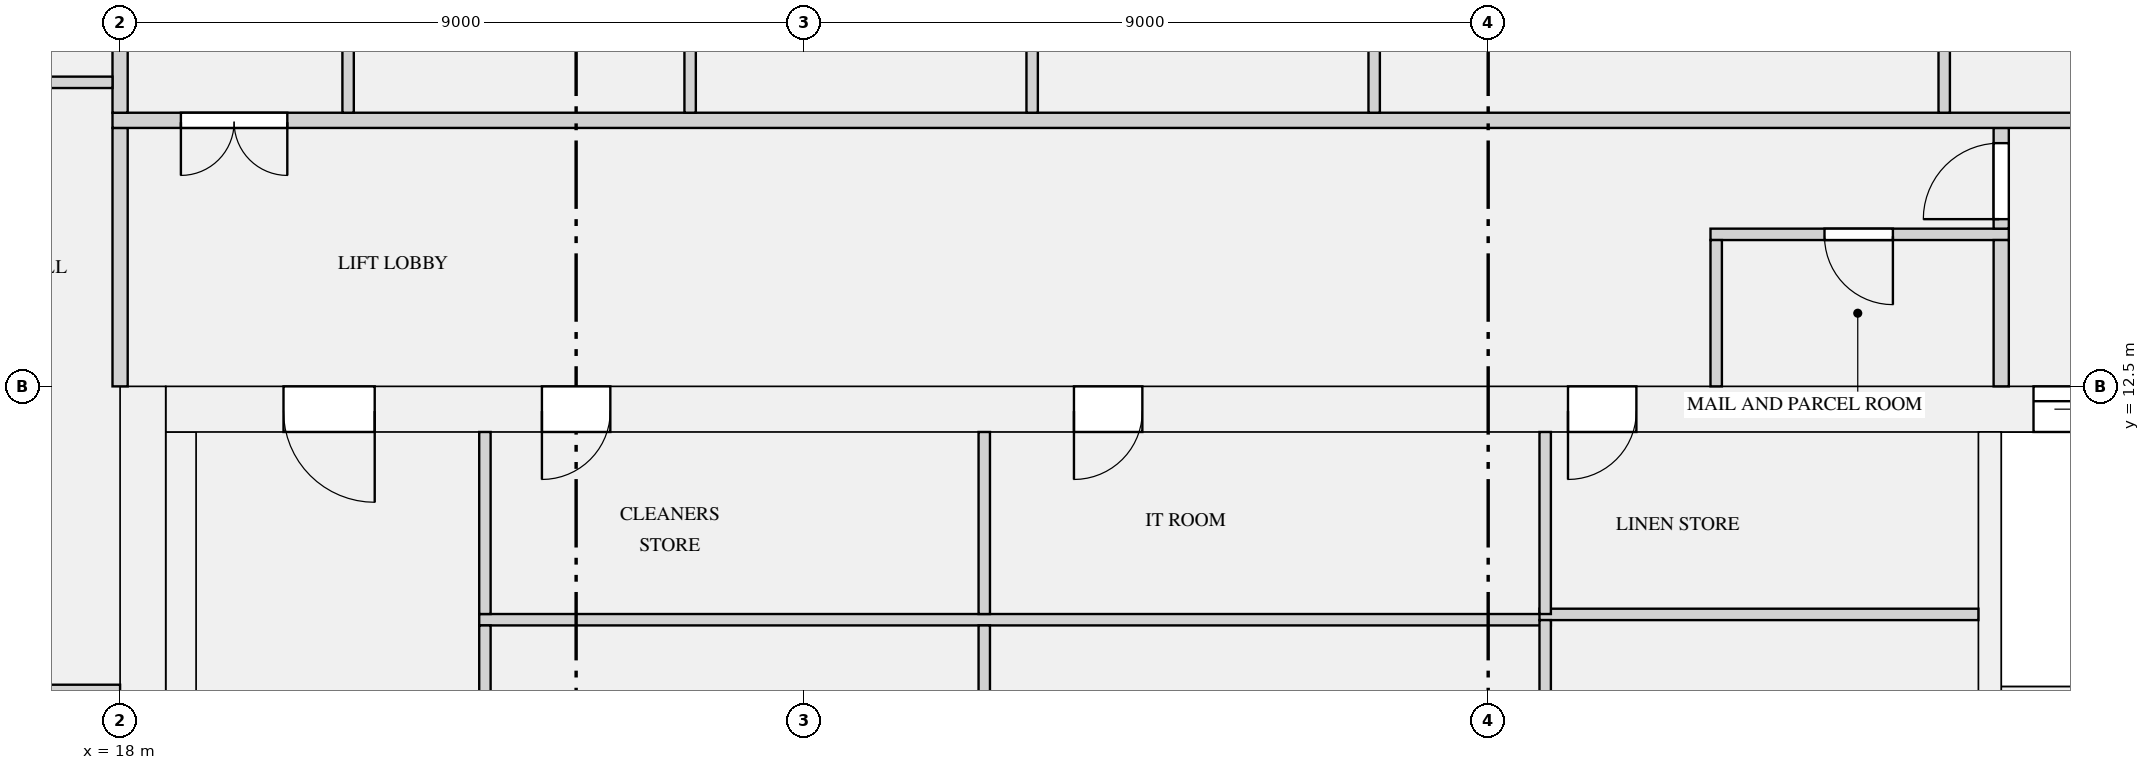
"""IFC4 building model, lengths in metres.
Left out: names, types, materials, properties, quantities, classifications, styles, units other than length and angle.
Written with IfcOpenShell. Run it as: python <this file> out.ifc"""

import sys

from ifc_helpers import new_model, si_unit, direction, frame, frame_2d, origin, place, context, subcontext, project, spatial, rectangle, extrude, element, fill, save


model = new_model("IFC4")
c1 = context("Model", 3, precision=1e-05, world=origin(), true_north=direction((0.0, 1.0)))
c2 = subcontext(c1, "Body", "Model", "MODEL_VIEW")
j1 = project(units=[si_unit("LENGTHUNIT", "METRE"), si_unit("PLANEANGLEUNIT", "RADIAN")], contexts=[c1])
p1 = place(None, origin())
s1 = spatial("IfcSite", under=j1, at=p1, CompositionType="ELEMENT")
p2 = place(p1, origin())
s2 = spatial("IfcBuilding", under=s1, at=p2, CompositionType="ELEMENT")
p3 = place(p2, frame((0.0, 0.0, 232.65)))
s3 = spatial("IfcBuildingStorey", under=s2, at=p3, CompositionType="ELEMENT", Elevation=232.65)
p4 = place(p3, frame((18.3, 0.0, 0.0), z_axis=(0.0, 0.0, 1.0), x_axis=(0.0, 1.0, 0.0)))
e1 = element("IfcWall", 1, at=p4, inside=s3, PredefinedType="SHEAR", context=c2, shape_type="SweptSolid", body=[
    extrude(rectangle(XDim=12.5, YDim=0.6, at=frame_2d((6.25, 0.0))), origin(), (0.0, 0.0, 1.0), 3.15),
])
p5 = place(p3, frame((18.6, 12.2, 0.0), z_axis=(0.0, 0.0, 1.0), x_axis=(1.0, 0.0, 0.0)))
e2 = element("IfcWall", 2, at=p5, inside=s3, PredefinedType="SHEAR", context=c2, shape_type="SweptSolid", body=[
    extrude(rectangle(XDim=34.8, YDim=0.6, at=frame_2d((17.4, 0.0))), origin(), (0.0, 0.0, 1.0), 3.15),
])
p6 = place(p5, frame((24.575, 0.0, 0.0)))
e3 = element("IfcOpeningElement", 3, at=p6, cuts=e2, PredefinedType="OPENING", context=c2, shape_type="SweptSolid", body=[
    extrude(rectangle(XDim=1.1, YDim=2.1, at=frame_2d((0.55, 1.05))), frame((0.0, 0.31, 0.0), z_axis=(0.0, -1.0, 0.0), x_axis=(1.0, 0.0, 0.0)), (0.0, 0.0, 1.0), 0.62),
])
p7 = place(p5, frame((26.825, 0.0, 0.0)))
e4 = element("IfcOpeningElement", 4, at=p7, cuts=e2, PredefinedType="OPENING", context=c2, shape_type="SweptSolid", body=[
    extrude(rectangle(XDim=1.1, YDim=2.1, at=frame_2d((0.55, 1.05))), frame((0.0, 0.31, 0.0), z_axis=(0.0, -1.0, 0.0), x_axis=(1.0, 0.0, 0.0)), (0.0, 0.0, 1.0), 0.62),
])
p8 = place(p5, frame((29.075, 0.0, 0.0)))
e5 = element("IfcOpeningElement", 5, at=p8, cuts=e2, PredefinedType="OPENING", context=c2, shape_type="SweptSolid", body=[
    extrude(rectangle(XDim=1.1, YDim=2.1, at=frame_2d((0.55, 1.05))), frame((0.0, 0.31, 0.0), z_axis=(0.0, -1.0, 0.0), x_axis=(1.0, 0.0, 0.0)), (0.0, 0.0, 1.0), 0.62),
])
p9 = place(p5, frame((4.95, 0.0, 0.0)))
e6 = element("IfcOpeningElement", 6, at=p9, cuts=e2, PredefinedType="OPENING", context=c2, shape_type="SweptSolid", body=[
    extrude(rectangle(XDim=0.9, YDim=2.1, at=frame_2d((0.45, 1.05))), frame((0.0, 0.31, 0.0), z_axis=(0.0, -1.0, 0.0), x_axis=(1.0, 0.0, 0.0)), (0.0, 0.0, 1.0), 0.62),
])
p10 = place(p5, frame((11.95, 0.0, 0.0)))
e7 = element("IfcOpeningElement", 7, at=p10, cuts=e2, PredefinedType="OPENING", context=c2, shape_type="SweptSolid", body=[
    extrude(rectangle(XDim=0.9, YDim=2.1, at=frame_2d((0.45, 1.05))), frame((0.0, 0.31, 0.0), z_axis=(0.0, -1.0, 0.0), x_axis=(1.0, 0.0, 0.0)), (0.0, 0.0, 1.0), 0.62),
])
p11 = place(p5, frame((18.45, 0.0, 0.0)))
e8 = element("IfcOpeningElement", 8, at=p11, cuts=e2, PredefinedType="OPENING", context=c2, shape_type="SweptSolid", body=[
    extrude(rectangle(XDim=0.9, YDim=2.1, at=frame_2d((0.45, 1.05))), frame((0.0, 0.31, 0.0), z_axis=(0.0, -1.0, 0.0), x_axis=(1.0, 0.0, 0.0)), (0.0, 0.0, 1.0), 0.62),
])
p12 = place(p5, frame((1.55, 0.0, 0.0)))
e9 = element("IfcOpeningElement", 9, at=p12, cuts=e2, PredefinedType="OPENING", context=c2, shape_type="SweptSolid", body=[
    extrude(rectangle(XDim=1.2, YDim=2.1, at=frame_2d((0.6, 1.05))), frame((0.0, 0.31, 0.0), z_axis=(0.0, -1.0, 0.0), x_axis=(1.0, 0.0, 0.0)), (0.0, 0.0, 1.0), 0.62),
])
p13 = place(p5, frame((32.05, 0.0, 0.0)))
e10 = element("IfcOpeningElement", 10, at=p13, cuts=e2, PredefinedType="OPENING", context=c2, shape_type="SweptSolid", body=[
    extrude(rectangle(XDim=1.2, YDim=2.1, at=frame_2d((0.6, 1.05))), frame((0.0, 0.31, 0.0), z_axis=(0.0, -1.0, 0.0), x_axis=(1.0, 0.0, 0.0)), (0.0, 0.0, 1.0), 0.62),
])
p14 = place(p3, frame((18.8, 1.0, 0.0), z_axis=(0.0, 0.0, 1.0), x_axis=(0.0, 1.0, 0.0)))
e11 = element("IfcWall", 11, at=p14, inside=s3, PredefinedType="SHEAR", context=c2, shape_type="SweptSolid", body=[
    extrude(rectangle(XDim=10.9, YDim=0.4, at=frame_2d((5.45, 0.0))), origin(), (0.0, 0.0, 1.0), 3.15),
])
p15 = place(p3, frame((42.75, 8.4, 0.0), z_axis=(0.0, 0.0, 1.0), x_axis=(1.0, 0.0, 0.0)))
e12 = element("IfcWall", 12, at=p15, inside=s3, PredefinedType="SHEAR", context=c2, shape_type="SweptSolid", body=[
    extrude(rectangle(XDim=1.95, YDim=0.3, at=frame_2d((0.975, 0.0))), origin(), (0.0, 0.0, 1.0), 3.15),
])
p16 = place(p3, frame((42.6, 8.25, 0.0), z_axis=(0.0, 0.0, 1.0), x_axis=(0.0, 1.0, 0.0)))
e13 = element("IfcWall", 13, at=p16, inside=s3, PredefinedType="SHEAR", context=c2, shape_type="SweptSolid", body=[
    extrude(rectangle(XDim=3.65, YDim=0.3, at=frame_2d((1.825, 0.0))), origin(), (0.0, 0.0, 1.0), 3.15),
])
p17 = place(p3, frame((22.725, 9.43, 0.0), z_axis=(0.0, 0.0, 1.0), x_axis=(1.0, 0.0, 0.0)))
e14 = element("IfcWall", 14, at=p17, inside=s3, PredefinedType="PARTITIONING", context=c2, shape_type="SweptSolid", body=[
    extrude(rectangle(XDim=14.1, YDim=0.15, at=frame_2d((7.05, 0.0))), origin(), (0.0, 0.0, 1.0), 2.8),
])
p18 = place(p3, frame((36.675, 9.5, 0.0), z_axis=(0.0, 0.0, 1.0), x_axis=(1.0, 0.0, 0.0)))
e15 = element("IfcWall", 15, at=p18, inside=s3, PredefinedType="PARTITIONING", context=c2, shape_type="SweptSolid", body=[
    extrude(rectangle(XDim=5.775, YDim=0.15, at=frame_2d((2.887, 0.0))), origin(), (0.0, 0.0, 1.0), 2.8),
])
p19 = place(p3, frame((38.925, 14.5, 0.0), z_axis=(0.0, 0.0, 1.0), x_axis=(1.0, 0.0, 0.0)))
e16 = element("IfcWall", 16, at=p19, inside=s3, PredefinedType="PARTITIONING", context=c2, shape_type="SweptSolid", body=[
    extrude(rectangle(XDim=3.925, YDim=0.15, at=frame_2d((1.962, 0.0))), origin(), (0.0, 0.0, 1.0), 2.8),
])
p20 = place(p19, frame((1.5, 0.0, 0.0)))
e17 = element("IfcOpeningElement", 17, at=p20, cuts=e16, PredefinedType="OPENING", context=c2, shape_type="SweptSolid", body=[
    extrude(rectangle(XDim=0.9, YDim=2.1, at=frame_2d((0.45, 1.05))), frame((0.0, 0.085, 0.0), z_axis=(0.0, -1.0, 0.0), x_axis=(1.0, 0.0, 0.0)), (0.0, 0.0, 1.0), 0.17),
])
for number, where, z_axis, x_axis in (
    (18, (22.8, 6.725, 0.0), (0.0, 0.0, 1.0), (0.0, 1.0, 0.0)),
    (19, (29.37, 6.725, 0.0), (0.0, 0.0, 1.0), (0.0, 1.0, 0.0)),
):
    element("IfcWall", number, at=place(p3, frame(where, z_axis=z_axis, x_axis=x_axis)), inside=s3, PredefinedType="PARTITIONING", context=c2, shape_type="SweptSolid", body=[
        extrude(rectangle(XDim=2.63, YDim=0.15, at=frame_2d((1.315, 0.0))), origin(), (0.0, 0.0, 1.0), 2.8),
    ])
p21 = place(p3, frame((36.75, 6.725, 0.0), z_axis=(0.0, 0.0, 1.0), x_axis=(0.0, 1.0, 0.0)))
e20 = element("IfcWall", 20, at=p21, inside=s3, PredefinedType="PARTITIONING", context=c2, shape_type="SweptSolid", body=[
    extrude(rectangle(XDim=2.7, YDim=0.15, at=frame_2d((1.35, 0.0))), origin(), (0.0, 0.0, 1.0), 2.8),
])
for number, where, z_axis, x_axis in (
    (21, (22.8, 9.505, 0.0), (0.0, 0.0, 1.0), (0.0, 1.0, 0.0)),
    (22, (29.37, 9.505, 0.0), (0.0, 0.0, 1.0), (0.0, 1.0, 0.0)),
    (23, (36.75, 9.505, 0.0), (0.0, 0.0, 1.0), (0.0, 1.0, 0.0)),
):
    element("IfcWall", number, at=place(p3, frame(where, z_axis=z_axis, x_axis=x_axis)), inside=s3, PredefinedType="PARTITIONING", context=c2, shape_type="SweptSolid", body=[
        extrude(rectangle(XDim=2.395, YDim=0.15, at=frame_2d((1.198, 0.0))), origin(), (0.0, 0.0, 1.0), 2.8),
    ])
p22 = place(p3, frame((18.0, 12.5, 0.0), z_axis=(0.0, 0.0, 1.0), x_axis=(0.0, 1.0, 0.0)))
e24 = element("IfcWall", 24, at=p22, inside=s3, PredefinedType="PARTITIONING", context=c2, shape_type="SweptSolid", body=[
    extrude(rectangle(XDim=3.4, YDim=0.2, at=frame_2d((1.7, 0.0))), origin(), (0.0, 0.0, 1.0), 2.8),
])
p23 = place(p3, frame((39.0, 12.5, 0.0), z_axis=(0.0, 0.0, 1.0), x_axis=(0.0, 1.0, 0.0)))
e25 = element("IfcWall", 25, at=p23, inside=s3, PredefinedType="PARTITIONING", context=c2, shape_type="SweptSolid", body=[
    extrude(rectangle(XDim=1.925, YDim=0.15, at=frame_2d((0.962, 0.0))), origin(), (0.0, 0.0, 1.0), 2.8),
])
p24 = place(p3, frame((42.75, 12.5, 0.0), z_axis=(0.0, 0.0, 1.0), x_axis=(0.0, 1.0, 0.0)))
e26 = element("IfcWall", 26, at=p24, inside=s3, PredefinedType="PARTITIONING", context=c2, shape_type="SweptSolid", body=[
    extrude(rectangle(XDim=1.925, YDim=0.2, at=frame_2d((0.962, 0.0))), origin(), (0.0, 0.0, 1.0), 2.8),
])
p25 = place(p3, frame((42.75, 14.575, 0.0), z_axis=(0.0, 0.0, 1.0), x_axis=(0.0, 1.0, 0.0)))
e27 = element("IfcWall", 27, at=p25, inside=s3, PredefinedType="PARTITIONING", context=c2, shape_type="SweptSolid", body=[
    extrude(rectangle(XDim=1.325, YDim=0.2, at=frame_2d((0.663, 0.0))), origin(), (0.0, 0.0, 1.0), 2.8),
])
p26 = place(p25, frame((0.125, 0.0, 0.0)))
e28 = element("IfcOpeningElement", 28, at=p26, cuts=e27, PredefinedType="OPENING", context=c2, shape_type="SweptSolid", body=[
    extrude(rectangle(XDim=1.0, YDim=2.1, at=frame_2d((0.5, 1.05))), frame((0.0, 0.11, 0.0), z_axis=(0.0, -1.0, 0.0), x_axis=(1.0, 0.0, 0.0)), (0.0, 0.0, 1.0), 0.22),
])
p27 = place(p3, frame((12.15, 16.5, 0.0), z_axis=(0.0, 0.0, 1.0), x_axis=(1.0, 0.0, 0.0)))
e29 = element("IfcWall", 29, at=p27, inside=s3, PredefinedType="PARTITIONING", context=c2, shape_type="SweptSolid", body=[
    extrude(rectangle(XDim=5.75, YDim=0.15, at=frame_2d((2.875, 0.0))), origin(), (0.0, 0.0, 1.0), 2.8),
])
p28 = place(p27, frame((0.4, 0.0, 0.0)))
e30 = element("IfcOpeningElement", 30, at=p28, cuts=e29, PredefinedType="OPENING", context=c2, shape_type="SweptSolid", body=[
    extrude(rectangle(XDim=0.9, YDim=2.1, at=frame_2d((0.45, 1.05))), frame((0.0, 0.085, 0.0), z_axis=(0.0, -1.0, 0.0), x_axis=(1.0, 0.0, 0.0)), (0.0, 0.0, 1.0), 0.17),
])
p29 = place(p27, frame((3.4, 0.0, 0.0)))
e31 = element("IfcOpeningElement", 31, at=p29, cuts=e29, PredefinedType="OPENING", context=c2, shape_type="SweptSolid", body=[
    extrude(rectangle(XDim=0.9, YDim=2.1, at=frame_2d((0.45, 1.05))), frame((0.0, 0.085, 0.0), z_axis=(0.0, -1.0, 0.0), x_axis=(1.0, 0.0, 0.0)), (0.0, 0.0, 1.0), 0.17),
])
p30 = place(p3, frame((9.65, 8.5, 0.0), z_axis=(0.0, 0.0, 1.0), x_axis=(1.0, 0.0, 0.0)))
e32 = element("IfcWall", 32, at=p30, inside=s3, PredefinedType="PARTITIONING", context=c2, shape_type="SweptSolid", body=[
    extrude(rectangle(XDim=8.35, YDim=0.15, at=frame_2d((4.175, 0.0))), origin(), (0.0, 0.0, 1.0), 2.8),
])
p31 = place(p30, frame((5.9, 0.0, 0.0)))
e33 = element("IfcOpeningElement", 33, at=p31, cuts=e32, PredefinedType="OPENING", context=c2, shape_type="SweptSolid", body=[
    extrude(rectangle(XDim=0.9, YDim=2.1, at=frame_2d((0.45, 1.05))), frame((0.0, 0.085, 0.0), z_axis=(0.0, -1.0, 0.0), x_axis=(1.0, 0.0, 0.0)), (0.0, 0.0, 1.0), 0.17),
])
p32 = place(p3, frame((17.9, 16.0, 0.0), z_axis=(0.0, 0.0, 1.0), x_axis=(1.0, 0.0, 0.0)))
e34 = element("IfcWall", 34, at=p32, inside=s3, PredefinedType="PARTITIONING", context=c2, shape_type="SweptSolid", body=[
    extrude(rectangle(XDim=36.2, YDim=0.2, at=frame_2d((18.1, 0.0))), origin(), (0.0, 0.0, 1.0), 2.8),
])
p33 = place(p32, frame((0.9, 0.0, 0.0)))
e35 = element("IfcOpeningElement", 35, at=p33, cuts=e34, PredefinedType="OPENING", context=c2, shape_type="SweptSolid", body=[
    extrude(rectangle(XDim=1.4, YDim=2.1, at=frame_2d((0.7, 1.05))), frame((0.0, 0.11, 0.0), z_axis=(0.0, -1.0, 0.0), x_axis=(1.0, 0.0, 0.0)), (0.0, 0.0, 1.0), 0.22),
])
p34 = place(p32, frame((33.9, 0.0, 0.0)))
e36 = element("IfcOpeningElement", 36, at=p34, cuts=e34, PredefinedType="OPENING", context=c2, shape_type="SweptSolid", body=[
    extrude(rectangle(XDim=1.4, YDim=2.1, at=frame_2d((0.7, 1.05))), frame((0.0, 0.11, 0.0), z_axis=(0.0, -1.0, 0.0), x_axis=(1.0, 0.0, 0.0)), (0.0, 0.0, 1.0), 0.22),
])
p35 = place(p3, frame((18.0, 16.1, 0.0), z_axis=(0.0, 0.0, 1.0), x_axis=(0.0, 1.0, 0.0)))
e37 = element("IfcWall", 37, at=p35, inside=s3, PredefinedType="PARTITIONING", context=c2, shape_type="SweptSolid", body=[
    extrude(rectangle(XDim=7.8, YDim=0.2, at=frame_2d((3.9, 0.0))), origin(), (0.0, 0.0, 1.0), 2.8),
])
p36 = place(p35, frame((5.35, 0.0, 0.0)))
e38 = element("IfcOpeningElement", 38, at=p36, cuts=e37, PredefinedType="OPENING", context=c2, shape_type="SweptSolid", body=[
    extrude(rectangle(XDim=1.1, YDim=2.1, at=frame_2d((0.55, 1.05))), frame((0.0, 0.11, 0.0), z_axis=(0.0, -1.0, 0.0), x_axis=(1.0, 0.0, 0.0)), (0.0, 0.0, 1.0), 0.22),
])
p37 = place(p3, frame((21.0, 16.1, 0.0), z_axis=(0.0, 0.0, 1.0), x_axis=(0.0, 1.0, 0.0)))
e39 = element("IfcWall", 39, at=p37, inside=s3, PredefinedType="PARTITIONING", context=c2, shape_type="SweptSolid", body=[
    extrude(rectangle(XDim=4.825, YDim=0.15, at=frame_2d((2.413, 0.0))), origin(), (0.0, 0.0, 1.0), 2.8),
])
p38 = place(p37, frame((1.95, 0.0, 0.0)))
e40 = element("IfcOpeningElement", 40, at=p38, cuts=e39, PredefinedType="OPENING", context=c2, shape_type="SweptSolid", body=[
    extrude(rectangle(XDim=0.9, YDim=2.1, at=frame_2d((0.45, 1.05))), frame((0.0, 0.085, 0.0), z_axis=(0.0, -1.0, 0.0), x_axis=(1.0, 0.0, 0.0)), (0.0, 0.0, 1.0), 0.17),
])
for number, where, z_axis, x_axis in (
    (41, (25.5, 16.1, 0.0), (0.0, 0.0, 1.0), (0.0, 1.0, 0.0)),
    (42, (30.0, 16.1, 0.0), (0.0, 0.0, 1.0), (0.0, 1.0, 0.0)),
    (43, (34.5, 16.1, 0.0), (0.0, 0.0, 1.0), (0.0, 1.0, 0.0)),
    (44, (42.0, 16.1, 0.0), (0.0, 0.0, 1.0), (0.0, 1.0, 0.0)),
):
    element("IfcWall", number, at=place(p3, frame(where, z_axis=z_axis, x_axis=x_axis)), inside=s3, PredefinedType="PARTITIONING", context=c2, shape_type="SweptSolid", body=[
        extrude(rectangle(XDim=4.825, YDim=0.15, at=frame_2d((2.413, 0.0))), origin(), (0.0, 0.0, 1.0), 2.8),
    ])
p39 = place(p6, origin())
e45 = element("IfcDoor", 45, at=p39, inside=s3, OperationType="DOUBLE_DOOR_SLIDING", PredefinedType="DOOR", context=c2, shape_type="SweptSolid", body=[
    extrude(rectangle(XDim=1.1, YDim=2.1, at=frame_2d((0.55, 1.05))), frame((0.0, 0.025, 0.0), z_axis=(0.0, -1.0, 0.0), x_axis=(1.0, 0.0, 0.0)), (0.0, 0.0, 1.0), 0.05),
])
fill(e3, e45)
p40 = place(p20, frame((0.9, 0.0, 0.0), z_axis=(0.0, 0.0, 1.0), x_axis=(-1.0, 0.0, 0.0)))
e46 = element("IfcDoor", 46, at=p40, inside=s3, OperationType="SINGLE_SWING_LEFT", PredefinedType="DOOR", context=c2, shape_type="SweptSolid", body=[
    extrude(rectangle(XDim=0.9, YDim=2.1, at=frame_2d((0.45, 1.05))), frame((0.0, 0.025, 0.0), z_axis=(0.0, -1.0, 0.0), x_axis=(1.0, 0.0, 0.0)), (0.0, 0.0, 1.0), 0.05),
])
fill(e17, e46)
p41 = place(p9, frame((0.9, 0.0, 0.0), z_axis=(0.0, 0.0, 1.0), x_axis=(-1.0, 0.0, 0.0)))
e47 = element("IfcDoor", 47, at=p41, inside=s3, OperationType="SINGLE_SWING_RIGHT", PredefinedType="DOOR", context=c2, shape_type="SweptSolid", body=[
    extrude(rectangle(XDim=0.9, YDim=2.1, at=frame_2d((0.45, 1.05))), frame((0.0, 0.025, 0.0), z_axis=(0.0, -1.0, 0.0), x_axis=(1.0, 0.0, 0.0)), (0.0, 0.0, 1.0), 0.05),
])
fill(e6, e47)
p42 = place(p10, frame((0.9, 0.0, 0.0), z_axis=(0.0, 0.0, 1.0), x_axis=(-1.0, 0.0, 0.0)))
e48 = element("IfcDoor", 48, at=p42, inside=s3, OperationType="SINGLE_SWING_RIGHT", PredefinedType="DOOR", context=c2, shape_type="SweptSolid", body=[
    extrude(rectangle(XDim=0.9, YDim=2.1, at=frame_2d((0.45, 1.05))), frame((0.0, 0.025, 0.0), z_axis=(0.0, -1.0, 0.0), x_axis=(1.0, 0.0, 0.0)), (0.0, 0.0, 1.0), 0.05),
])
fill(e7, e48)
p43 = place(p11, frame((0.9, 0.0, 0.0), z_axis=(0.0, 0.0, 1.0), x_axis=(-1.0, 0.0, 0.0)))
e49 = element("IfcDoor", 49, at=p43, inside=s3, OperationType="SINGLE_SWING_RIGHT", PredefinedType="DOOR", context=c2, shape_type="SweptSolid", body=[
    extrude(rectangle(XDim=0.9, YDim=2.1, at=frame_2d((0.45, 1.05))), frame((0.0, 0.025, 0.0), z_axis=(0.0, -1.0, 0.0), x_axis=(1.0, 0.0, 0.0)), (0.0, 0.0, 1.0), 0.05),
])
fill(e8, e49)
p44 = place(p12, frame((1.2, 0.0, 0.0), z_axis=(0.0, 0.0, 1.0), x_axis=(-1.0, 0.0, 0.0)))
e50 = element("IfcDoor", 50, at=p44, inside=s3, OperationType="SINGLE_SWING_LEFT", PredefinedType="DOOR", context=c2, shape_type="SweptSolid", body=[
    extrude(rectangle(XDim=1.2, YDim=2.1, at=frame_2d((0.6, 1.05))), frame((0.0, 0.025, 0.0), z_axis=(0.0, -1.0, 0.0), x_axis=(1.0, 0.0, 0.0)), (0.0, 0.0, 1.0), 0.05),
])
fill(e9, e50)
p45 = place(p26, origin())
e51 = element("IfcDoor", 51, at=p45, inside=s3, OperationType="SINGLE_SWING_LEFT", PredefinedType="DOOR", context=c2, shape_type="SweptSolid", body=[
    extrude(rectangle(XDim=1.0, YDim=2.1, at=frame_2d((0.5, 1.05))), frame((0.0, 0.025, 0.0), z_axis=(0.0, -1.0, 0.0), x_axis=(1.0, 0.0, 0.0)), (0.0, 0.0, 1.0), 0.05),
])
fill(e28, e51)
p46 = place(p33, frame((1.4, 0.0, 0.0), z_axis=(0.0, 0.0, 1.0), x_axis=(-1.0, 0.0, 0.0)))
e52 = element("IfcDoor", 52, at=p46, inside=s3, OperationType="DOUBLE_DOOR_SINGLE_SWING", PredefinedType="DOOR", context=c2, shape_type="SweptSolid", body=[
    extrude(rectangle(XDim=1.4, YDim=2.1, at=frame_2d((0.7, 1.05))), frame((0.0, 0.025, 0.0), z_axis=(0.0, -1.0, 0.0), x_axis=(1.0, 0.0, 0.0)), (0.0, 0.0, 1.0), 0.05),
])
fill(e35, e52)
save(model, sys.argv[1])
